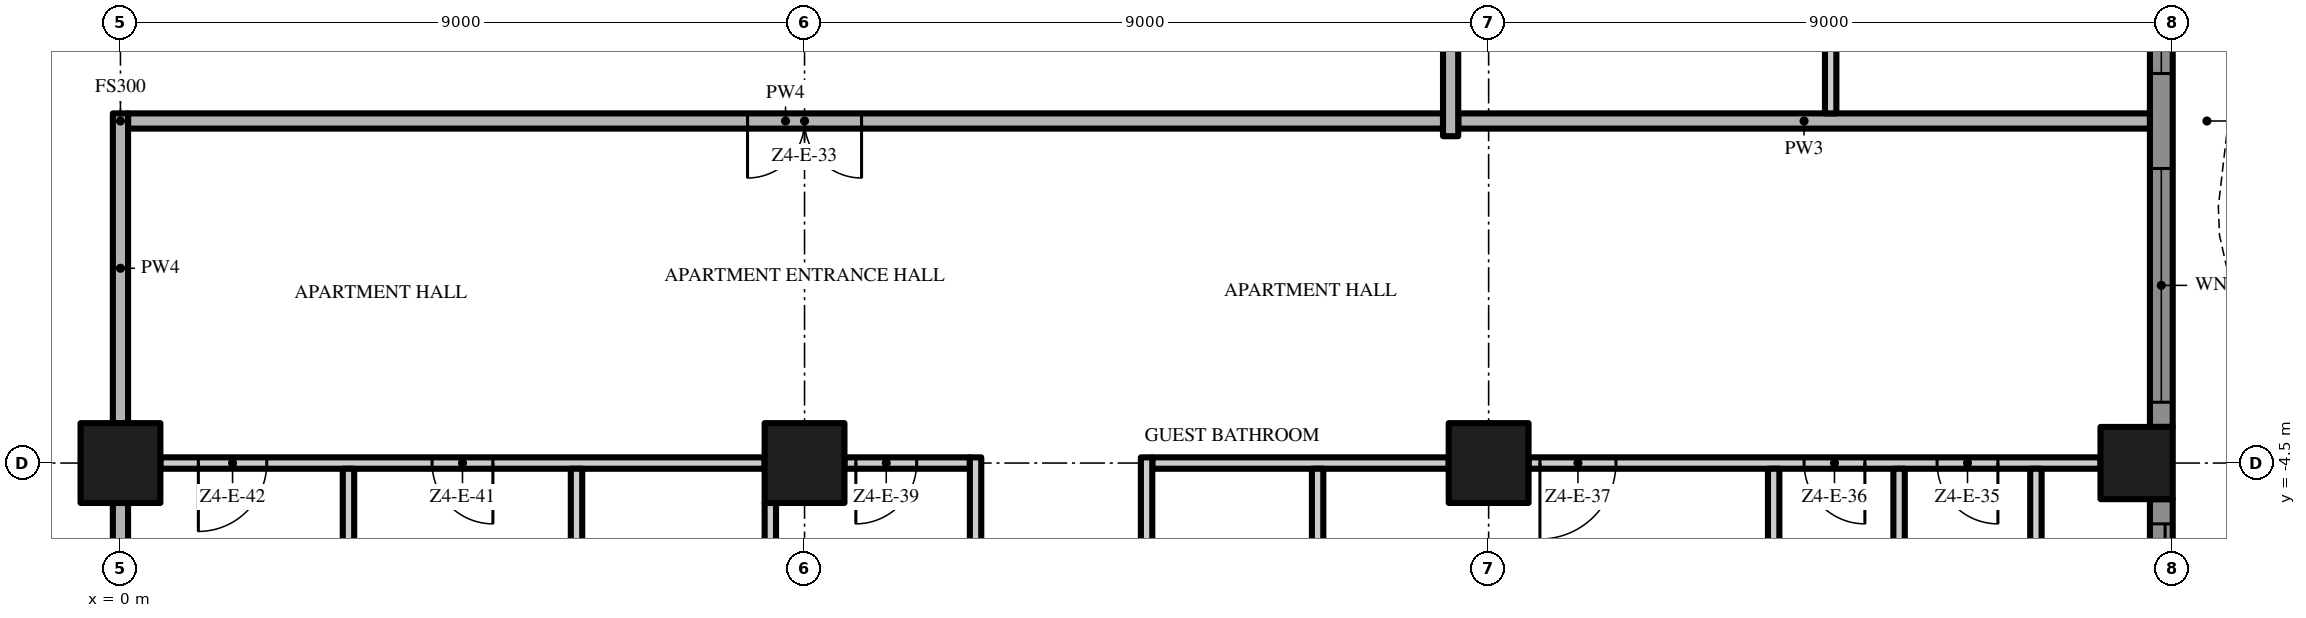
"""IFC4 building model, lengths in metres.
Left out: names, types, materials, properties, quantities, classifications, styles, units other than length and angle.
Written with IfcOpenShell. Run it as: python <this file> out.ifc"""

import sys

from ifc_helpers import new_model, si_unit, direction, frame, frame_2d, origin, origin_2d, place, context, subcontext, project, spatial, polyline, rectangle, outline, extrude, element, fill, save


model = new_model("IFC4")
c1 = context("Model", 3, precision=1e-05, world=origin(), true_north=direction((0.0, 1.0)))
c2 = subcontext(c1, "Body", "Model", "MODEL_VIEW")
j1 = project(units=[si_unit("LENGTHUNIT", "METRE"), si_unit("PLANEANGLEUNIT", "RADIAN")], contexts=[c1])
p1 = place(None, origin())
s1 = spatial("IfcSite", under=j1, at=p1, CompositionType="ELEMENT")
p2 = place(p1, origin())
s2 = spatial("IfcBuilding", under=s1, at=p2, CompositionType="ELEMENT")
p3 = place(p2, frame((0.0, 0.0, 230.0)))
s3 = spatial("IfcBuildingStorey", under=s2, at=p3, CompositionType="ELEMENT", Elevation=230.0)
for number, where, z_axis, x_axis in (
    (1, (0.0, -4.5, 0.0), (0.0, 0.0, 1.0), (1.0, 0.0, 0.0)),
    (2, (18.0, -4.5, 0.0), (0.0, 0.0, 1.0), (1.0, 0.0, 0.0)),
):
    element("IfcColumn", number, at=place(p3, frame(where, z_axis=z_axis, x_axis=x_axis)), inside=s3, PredefinedType="COLUMN", context=c2, shape_type="SweptSolid", body=[
        extrude(rectangle(XDim=1.05, YDim=1.05, at=origin_2d()), origin(), (0.0, 0.0, 1.0), 3.5),
    ])
p4 = place(p3, frame((26.525, -4.5, 0.0), z_axis=(0.0, 0.0, 1.0), x_axis=(1.0, 0.0, 0.0)))
e3 = element("IfcColumn", 3, at=p4, inside=s3, PredefinedType="COLUMN", context=c2, shape_type="SweptSolid", body=[
    extrude(rectangle(XDim=0.95, YDim=0.95, at=origin_2d()), origin(), (0.0, 0.0, 1.0), 3.5),
])
p5 = place(p3, frame((9.0, -4.5, 0.0), z_axis=(0.0, 0.0, 1.0), x_axis=(1.0, 0.0, 0.0)))
e4 = element("IfcColumn", 4, at=p5, inside=s3, PredefinedType="COLUMN", context=c2, shape_type="SweptSolid", body=[
    extrude(rectangle(XDim=1.05, YDim=1.05, at=origin_2d()), origin(), (0.0, 0.0, 1.0), 3.5),
])
p6 = place(p3, frame((26.85, -4.975, 0.0), z_axis=(0.0, 0.0, 1.0), x_axis=(0.0, -1.0, 0.0)))
e5 = element("IfcWall", 5, at=p6, inside=s3, PredefinedType="SOLIDWALL", context=c2, shape_type="SweptSolid", body=[
    extrude(rectangle(XDim=8.05, YDim=0.3, at=frame_2d((4.025, 0.0))), origin(), (0.0, 0.0, 1.0), 3.5),
])
p7 = place(p6, frame((4.65, 0.0, 0.0)))
e6 = element("IfcOpeningElement", 6, at=p7, cuts=e5, PredefinedType="OPENING", context=c2, shape_type="SweptSolid", body=[
    extrude(rectangle(XDim=3.075, YDim=2.4, at=frame_2d((1.538, 1.2))), frame((0.0, 0.16, 0.0), z_axis=(0.0, -1.0, 0.0), x_axis=(1.0, 0.0, 0.0)), (0.0, 0.0, 1.0), 0.32),
])
p8 = place(p6, frame((0.325, 0.0, 0.0)))
e7 = element("IfcOpeningElement", 7, at=p8, cuts=e5, PredefinedType="OPENING", context=c2, shape_type="SweptSolid", body=[
    extrude(rectangle(XDim=3.075, YDim=2.4, at=frame_2d((1.538, 1.2))), frame((0.0, 0.16, 0.0), z_axis=(0.0, -1.0, 0.0), x_axis=(1.0, 0.0, 0.0)), (0.0, 0.0, 1.0), 0.32),
])
p9 = place(p3, frame((26.85, 4.025, 0.0), z_axis=(0.0, 0.0, 1.0), x_axis=(0.0, -1.0, 0.0)))
e8 = element("IfcWall", 8, at=p9, inside=s3, PredefinedType="SOLIDWALL", context=c2, shape_type="SweptSolid", body=[
    extrude(rectangle(XDim=8.05, YDim=0.3, at=frame_2d((4.025, 0.0))), origin(), (0.0, 0.0, 1.0), 3.5),
])
p10 = place(p9, frame((4.65, 0.0, 0.45)))
e9 = element("IfcOpeningElement", 9, at=p10, cuts=e8, PredefinedType="OPENING", context=c2, shape_type="SweptSolid", body=[
    extrude(rectangle(XDim=3.075, YDim=2.65, at=frame_2d((1.538, 1.325))), frame((0.0, 0.16, 0.0), z_axis=(0.0, -1.0, 0.0), x_axis=(1.0, 0.0, 0.0)), (0.0, 0.0, 1.0), 0.32),
])
p11 = place(p9, frame((0.325, 0.0, 0.45)))
e10 = element("IfcOpeningElement", 10, at=p11, cuts=e8, PredefinedType="OPENING", context=c2, shape_type="SweptSolid", body=[
    extrude(rectangle(XDim=3.075, YDim=2.65, at=frame_2d((1.538, 1.325))), frame((0.0, 0.16, 0.0), z_axis=(0.0, -1.0, 0.0), x_axis=(1.0, 0.0, 0.0)), (0.0, 0.0, 1.0), 0.32),
])
p12 = place(p3, origin())
e11 = element("IfcWall", 11, at=p12, inside=s3, PredefinedType="USERDEFINED", context=c2, shape_type="SweptSolid", body=[
    extrude(outline(polyline([(27.951, -18.0), (27.615, -16.5), (27.6, -16.125), (27.731, -15.0), (28.255, -13.5), (28.988, -12.0), (29.649, -10.5), (29.985, -9.0), (30.0, -8.625), (29.869, -7.5), (29.345, -6.0), (28.612, -4.5), (27.951, -3.0), (27.615, -1.5), (27.6, -1.125), (27.731, 0.0), (28.255, 1.5), (28.988, 3.0), (29.649, 4.5), (29.985, 6.0), (30.0, 6.375), (29.869, 7.5), (29.345, 9.0), (28.612, 10.5), (27.951, 12.0), (27.615, 13.5), (27.6, 13.875), (27.731, 15.0), (28.255, 16.5), (28.988, 18.0), (28.763, 18.11), (28.024, 16.596), (27.486, 15.056), (27.349, 13.885), (27.366, 13.467), (27.713, 11.921), (28.385, 10.395), (29.114, 8.904), (29.624, 7.444), (29.749, 6.365), (29.736, 6.033), (29.41, 4.579), (28.761, 3.105), (28.024, 1.596), (27.486, 0.056), (27.349, -1.115), (27.366, -1.533), (27.713, -3.079), (28.385, -4.605), (29.114, -6.096), (29.624, -7.556), (29.749, -8.635), (29.736, -8.967), (29.41, -10.421), (28.761, -11.895), (28.024, -13.404), (27.486, -14.944), (27.349, -16.115), (27.366, -16.533), (27.708, -18.055), (27.951, -18.0)])), origin(), (0.0, 0.0, 1.0), 0.9),
])
p13 = place(p3, frame((8.475, -4.5, 0.0), z_axis=(0.0, 0.0, 1.0), x_axis=(-1.0, 0.0, 0.0)))
e12 = element("IfcWall", 12, at=p13, inside=s3, PredefinedType="PARTITIONING", context=c2, shape_type="SweptSolid", body=[
    extrude(rectangle(XDim=7.95, YDim=0.15, at=frame_2d((3.975, 0.0))), origin(), (0.0, 0.0, 1.0), 3.5),
])
p14 = place(p13, frame((3.575, 0.0, 0.0)))
e13 = element("IfcOpeningElement", 13, at=p14, cuts=e12, PredefinedType="OPENING", context=c2, shape_type="SweptSolid", body=[
    extrude(rectangle(XDim=0.8, YDim=2.0, at=frame_2d((0.4, 1.0))), frame((0.0, 0.085, 0.0), z_axis=(0.0, -1.0, 0.0), x_axis=(1.0, 0.0, 0.0)), (0.0, 0.0, 1.0), 0.17),
])
p15 = place(p13, frame((6.55, 0.0, 0.0)))
e14 = element("IfcOpeningElement", 14, at=p15, cuts=e12, PredefinedType="OPENING", context=c2, shape_type="SweptSolid", body=[
    extrude(rectangle(XDim=0.9, YDim=2.1, at=frame_2d((0.45, 1.05))), frame((0.0, 0.085, 0.0), z_axis=(0.0, -1.0, 0.0), x_axis=(1.0, 0.0, 0.0)), (0.0, 0.0, 1.0), 0.17),
])
p16 = place(p3, frame((11.175, -4.5, 0.0), z_axis=(0.0, 0.0, 1.0), x_axis=(-1.0, 0.0, 0.0)))
e15 = element("IfcWall", 15, at=p16, inside=s3, PredefinedType="PARTITIONING", context=c2, shape_type="SweptSolid", body=[
    extrude(rectangle(XDim=1.65, YDim=0.15, at=frame_2d((0.825, 0.0))), origin(), (0.0, 0.0, 1.0), 3.5),
])
p17 = place(p16, frame((0.7, 0.0, 0.0)))
e16 = element("IfcOpeningElement", 16, at=p17, cuts=e15, PredefinedType="OPENING", context=c2, shape_type="SweptSolid", body=[
    extrude(rectangle(XDim=0.8, YDim=2.0, at=frame_2d((0.4, 1.0))), frame((0.0, 0.085, 0.0), z_axis=(0.0, -1.0, 0.0), x_axis=(1.0, 0.0, 0.0)), (0.0, 0.0, 1.0), 0.17),
])
p18 = place(p3, frame((13.575, -4.5, 0.0), z_axis=(0.0, 0.0, 1.0), x_axis=(1.0, 0.0, 0.0)))
e17 = element("IfcWall", 17, at=p18, inside=s3, PredefinedType="PARTITIONING", context=c2, shape_type="SweptSolid", body=[
    extrude(rectangle(XDim=3.9, YDim=0.15, at=frame_2d((1.95, 0.0))), origin(), (0.0, 0.0, 1.0), 3.5),
])
p19 = place(p3, frame((26.05, -4.5, 0.0), z_axis=(0.0, 0.0, 1.0), x_axis=(-1.0, 0.0, 0.0)))
e18 = element("IfcWall", 18, at=p19, inside=s3, PredefinedType="PARTITIONING", context=c2, shape_type="SweptSolid", body=[
    extrude(rectangle(XDim=7.525, YDim=0.15, at=frame_2d((3.763, 0.0))), origin(), (0.0, 0.0, 1.0), 3.5),
])
p20 = place(p19, frame((1.35, 0.0, 0.0)))
e19 = element("IfcOpeningElement", 19, at=p20, cuts=e18, PredefinedType="OPENING", context=c2, shape_type="SweptSolid", body=[
    extrude(rectangle(XDim=0.8, YDim=2.0, at=frame_2d((0.4, 1.0))), frame((0.0, 0.085, 0.0), z_axis=(0.0, -1.0, 0.0), x_axis=(1.0, 0.0, 0.0)), (0.0, 0.0, 1.0), 0.17),
])
p21 = place(p19, frame((3.1, 0.0, 0.0)))
e20 = element("IfcOpeningElement", 20, at=p21, cuts=e18, PredefinedType="OPENING", context=c2, shape_type="SweptSolid", body=[
    extrude(rectangle(XDim=0.8, YDim=2.0, at=frame_2d((0.4, 1.0))), frame((0.0, 0.085, 0.0), z_axis=(0.0, -1.0, 0.0), x_axis=(1.0, 0.0, 0.0)), (0.0, 0.0, 1.0), 0.17),
])
p22 = place(p19, frame((6.375, 0.0, 0.0)))
e21 = element("IfcOpeningElement", 21, at=p22, cuts=e18, PredefinedType="OPENING", context=c2, shape_type="SweptSolid", body=[
    extrude(rectangle(XDim=1.0, YDim=2.4, at=frame_2d((0.5, 1.2))), frame((0.0, 0.085, 0.0), z_axis=(0.0, -1.0, 0.0), x_axis=(1.0, 0.0, 0.0)), (0.0, 0.0, 1.0), 0.17),
])
p23 = place(p3, frame((17.4, 0.0, 0.0), z_axis=(0.0, 0.0, 1.0), x_axis=(-1.0, 0.0, 0.0)))
e22 = element("IfcWall", 22, at=p23, inside=s3, PredefinedType="PARTITIONING", context=c2, shape_type="SweptSolid", body=[
    extrude(rectangle(XDim=17.3, YDim=0.2, at=frame_2d((8.65, 0.0))), origin(), (0.0, 0.0, 1.0), 3.5),
])
p24 = place(p23, frame((7.65, 0.0, 0.0)))
e23 = element("IfcOpeningElement", 23, at=p24, cuts=e22, PredefinedType="OPENING", context=c2, shape_type="SweptSolid", body=[
    extrude(rectangle(XDim=1.5, YDim=2.4, at=frame_2d((0.75, 1.2))), frame((0.0, 0.11, 0.0), z_axis=(0.0, -1.0, 0.0), x_axis=(1.0, 0.0, 0.0)), (0.0, 0.0, 1.0), 0.22),
])
p25 = place(p3, frame((17.6, 0.0, 0.0), z_axis=(0.0, 0.0, 1.0), x_axis=(1.0, 0.0, 0.0)))
e24 = element("IfcWall", 24, at=p25, inside=s3, PredefinedType="PARTITIONING", context=c2, shape_type="SweptSolid", body=[
    extrude(rectangle(XDim=9.1, YDim=0.2, at=frame_2d((4.55, 0.0))), origin(), (0.0, 0.0, 1.0), 3.5),
])
p26 = place(p3, frame((0.0, -12.975, 0.0), z_axis=(0.0, 0.0, 1.0), x_axis=(0.0, 1.0, 0.0)))
e25 = element("IfcWall", 25, at=p26, inside=s3, PredefinedType="PARTITIONING", context=c2, shape_type="SweptSolid", body=[
    extrude(rectangle(XDim=7.95, YDim=0.2, at=frame_2d((3.975, 0.0))), origin(), (0.0, 0.0, 1.0), 3.5),
])
p27 = place(p3, frame((0.0, -3.975, 0.0), z_axis=(0.0, 0.0, 1.0), x_axis=(0.0, 1.0, 0.0)))
e26 = element("IfcWall", 26, at=p27, inside=s3, PredefinedType="PARTITIONING", context=c2, shape_type="SweptSolid", body=[
    extrude(rectangle(XDim=4.075, YDim=0.2, at=frame_2d((2.038, 0.0))), origin(), (0.0, 0.0, 1.0), 3.5),
])
for number, where, z_axis, x_axis in (
    (27, (3.0, -8.925, 0.0), (0.0, 0.0, 1.0), (0.0, 1.0, 0.0)),
    (28, (6.0, -8.925, 0.0), (0.0, 0.0, 1.0), (0.0, 1.0, 0.0)),
):
    element("IfcWall", number, at=place(p3, frame(where, z_axis=z_axis, x_axis=x_axis)), inside=s3, PredefinedType="PARTITIONING", context=c2, shape_type="SweptSolid", body=[
        extrude(rectangle(XDim=4.35, YDim=0.15, at=frame_2d((2.175, 0.0))), origin(), (0.0, 0.0, 1.0), 3.5),
    ])
p28 = place(p3, frame((8.55, -8.925, 0.0), z_axis=(0.0, 0.0, 1.0), x_axis=(0.0, 1.0, 0.0)))
e29 = element("IfcWall", 29, at=p28, inside=s3, PredefinedType="PARTITIONING", context=c2, shape_type="SweptSolid", body=[
    extrude(rectangle(XDim=3.9, YDim=0.15, at=frame_2d((1.95, 0.0))), origin(), (0.0, 0.0, 1.0), 3.5),
])
p29 = place(p3, frame((11.25, -9.075, 0.0), z_axis=(0.0, 0.0, 1.0), x_axis=(0.0, 1.0, 0.0)))
e30 = element("IfcWall", 30, at=p29, inside=s3, PredefinedType="PARTITIONING", context=c2, shape_type="SweptSolid", body=[
    extrude(rectangle(XDim=4.65, YDim=0.15, at=frame_2d((2.325, 0.0))), origin(), (0.0, 0.0, 1.0), 3.5),
])
p30 = place(p3, frame((13.5, -4.425, 0.0), z_axis=(0.0, 0.0, 1.0), x_axis=(0.0, -1.0, 0.0)))
e31 = element("IfcWall", 31, at=p30, inside=s3, PredefinedType="PARTITIONING", context=c2, shape_type="SweptSolid", body=[
    extrude(rectangle(XDim=4.65, YDim=0.15, at=frame_2d((2.325, 0.0))), origin(), (0.0, 0.0, 1.0), 3.5),
])
p31 = place(p30, frame((1.875, 0.0, 0.0)))
e32 = element("IfcOpeningElement", 32, at=p31, cuts=e31, PredefinedType="OPENING", context=c2, shape_type="SweptSolid", body=[
    extrude(rectangle(XDim=0.9, YDim=2.1, at=frame_2d((0.45, 1.05))), frame((0.0, 0.085, 0.0), z_axis=(0.0, -1.0, 0.0), x_axis=(1.0, 0.0, 0.0)), (0.0, 0.0, 1.0), 0.17),
])
p32 = place(p3, frame((15.75, -8.925, 0.0), z_axis=(0.0, 0.0, 1.0), x_axis=(0.0, 1.0, 0.0)))
e33 = element("IfcWall", 33, at=p32, inside=s3, PredefinedType="PARTITIONING", context=c2, shape_type="SweptSolid", body=[
    extrude(rectangle(XDim=4.35, YDim=0.15, at=frame_2d((2.175, 0.0))), origin(), (0.0, 0.0, 1.0), 3.5),
])
p33 = place(p3, frame((17.5, -0.2, 0.0), z_axis=(0.0, 0.0, 1.0), x_axis=(0.0, 1.0, 0.0)))
e34 = element("IfcWall", 34, at=p33, inside=s3, PredefinedType="PARTITIONING", context=c2, shape_type="SweptSolid", body=[
    extrude(rectangle(XDim=4.175, YDim=0.2, at=frame_2d((2.087, 0.0))), origin(), (0.0, 0.0, 1.0), 3.5),
])
p34 = place(p3, frame((21.75, -8.925, 0.0), z_axis=(0.0, 0.0, 1.0), x_axis=(0.0, 1.0, 0.0)))
e35 = element("IfcWall", 35, at=p34, inside=s3, PredefinedType="PARTITIONING", context=c2, shape_type="SweptSolid", body=[
    extrude(rectangle(XDim=4.35, YDim=0.15, at=frame_2d((2.175, 0.0))), origin(), (0.0, 0.0, 1.0), 3.5),
])
p35 = place(p3, frame((22.5, 17.525, 0.0), z_axis=(0.0, 0.0, 1.0), x_axis=(0.0, -1.0, 0.0)))
e36 = element("IfcWall", 36, at=p35, inside=s3, PredefinedType="PARTITIONING", context=c2, shape_type="SweptSolid", body=[
    extrude(rectangle(XDim=17.425, YDim=0.15, at=frame_2d((8.713, 0.0))), origin(), (0.0, 0.0, 1.0), 3.5),
])
p36 = place(p35, frame((14.775, 0.0, 0.0)))
e37 = element("IfcOpeningElement", 37, at=p36, cuts=e36, PredefinedType="OPENING", context=c2, shape_type="SweptSolid", body=[
    extrude(rectangle(XDim=1.0, YDim=2.4, at=frame_2d((0.5, 1.2))), frame((0.0, 0.085, 0.0), z_axis=(0.0, -1.0, 0.0), x_axis=(1.0, 0.0, 0.0)), (0.0, 0.0, 1.0), 0.17),
])
p37 = place(p35, frame((9.175, 0.0, 0.0)))
e38 = element("IfcOpeningElement", 38, at=p37, cuts=e36, PredefinedType="OPENING", context=c2, shape_type="SweptSolid", body=[
    extrude(rectangle(XDim=1.0, YDim=2.4, at=frame_2d((0.5, 1.2))), frame((0.0, 0.085, 0.0), z_axis=(0.0, -1.0, 0.0), x_axis=(1.0, 0.0, 0.0)), (0.0, 0.0, 1.0), 0.17),
])
p38 = place(p35, frame((6.925, 0.0, 0.0)))
e39 = element("IfcOpeningElement", 39, at=p38, cuts=e36, PredefinedType="OPENING", context=c2, shape_type="SweptSolid", body=[
    extrude(rectangle(XDim=1.0, YDim=2.4, at=frame_2d((0.5, 1.2))), frame((0.0, 0.085, 0.0), z_axis=(0.0, -1.0, 0.0), x_axis=(1.0, 0.0, 0.0)), (0.0, 0.0, 1.0), 0.17),
])
for number, where, z_axis, x_axis in (
    (40, (23.4, -8.925, 0.0), (0.0, 0.0, 1.0), (0.0, 1.0, 0.0)),
    (41, (25.2, -8.925, 0.0), (0.0, 0.0, 1.0), (0.0, 1.0, 0.0)),
):
    element("IfcWall", number, at=place(p3, frame(where, z_axis=z_axis, x_axis=x_axis)), inside=s3, PredefinedType="PARTITIONING", context=c2, shape_type="SweptSolid", body=[
        extrude(rectangle(XDim=4.35, YDim=0.15, at=frame_2d((2.175, 0.0))), origin(), (0.0, 0.0, 1.0), 3.5),
    ])
p39 = place(p8, origin())
e42 = element("IfcDoor", 42, at=p39, inside=s3, OperationType="SINGLE_SWING_LEFT", PredefinedType="DOOR", context=c2, shape_type="SweptSolid", body=[
    extrude(rectangle(XDim=3.075, YDim=2.4, at=frame_2d((1.538, 1.2))), frame((0.0, 0.025, 0.0), z_axis=(0.0, -1.0, 0.0), x_axis=(1.0, 0.0, 0.0)), (0.0, 0.0, 1.0), 0.05),
])
fill(e7, e42)
p40 = place(p10, origin())
e43 = element("IfcWindow", 43, at=p40, inside=s3, PartitioningType="SINGLE_PANEL", PredefinedType="WINDOW", context=c2, shape_type="SweptSolid", body=[
    extrude(rectangle(XDim=3.075, YDim=2.65, at=frame_2d((1.538, 1.325))), frame((0.0, 0.03, 0.0), z_axis=(0.0, -1.0, 0.0), x_axis=(1.0, 0.0, 0.0)), (0.0, 0.0, 1.0), 0.06),
])
fill(e9, e43)
p41 = place(p11, origin())
e44 = element("IfcWindow", 44, at=p41, inside=s3, PartitioningType="SINGLE_PANEL", PredefinedType="WINDOW", context=c2, shape_type="SweptSolid", body=[
    extrude(rectangle(XDim=3.075, YDim=2.65, at=frame_2d((1.538, 1.325))), frame((0.0, 0.03, 0.0), z_axis=(0.0, -1.0, 0.0), x_axis=(1.0, 0.0, 0.0)), (0.0, 0.0, 1.0), 0.06),
])
fill(e10, e44)
p42 = place(p24, origin())
e45 = element("IfcDoor", 45, at=p42, inside=s3, OperationType="DOUBLE_DOOR_SINGLE_SWING", PredefinedType="DOOR", context=c2, shape_type="SweptSolid", body=[
    extrude(rectangle(XDim=1.5, YDim=2.4, at=frame_2d((0.75, 1.2))), frame((0.0, 0.025, 0.0), z_axis=(0.0, -1.0, 0.0), x_axis=(1.0, 0.0, 0.0)), (0.0, 0.0, 1.0), 0.05),
])
fill(e23, e45)
p43 = place(p20, origin())
e46 = element("IfcDoor", 46, at=p43, inside=s3, OperationType="SINGLE_SWING_LEFT", PredefinedType="DOOR", context=c2, shape_type="SweptSolid", body=[
    extrude(rectangle(XDim=0.8, YDim=2.0, at=frame_2d((0.4, 1.0))), frame((0.0, 0.025, 0.0), z_axis=(0.0, -1.0, 0.0), x_axis=(1.0, 0.0, 0.0)), (0.0, 0.0, 1.0), 0.05),
])
fill(e19, e46)
p44 = place(p21, origin())
e47 = element("IfcDoor", 47, at=p44, inside=s3, OperationType="SINGLE_SWING_LEFT", PredefinedType="DOOR", context=c2, shape_type="SweptSolid", body=[
    extrude(rectangle(XDim=0.8, YDim=2.0, at=frame_2d((0.4, 1.0))), frame((0.0, 0.025, 0.0), z_axis=(0.0, -1.0, 0.0), x_axis=(1.0, 0.0, 0.0)), (0.0, 0.0, 1.0), 0.05),
])
fill(e20, e47)
p45 = place(p22, origin())
e48 = element("IfcDoor", 48, at=p45, inside=s3, OperationType="SINGLE_SWING_RIGHT", PredefinedType="DOOR", context=c2, shape_type="SweptSolid", body=[
    extrude(rectangle(XDim=1.0, YDim=2.4, at=frame_2d((0.5, 1.2))), frame((0.0, 0.025, 0.0), z_axis=(0.0, -1.0, 0.0), x_axis=(1.0, 0.0, 0.0)), (0.0, 0.0, 1.0), 0.05),
])
fill(e21, e48)
p46 = place(p17, origin())
e49 = element("IfcDoor", 49, at=p46, inside=s3, OperationType="SINGLE_SWING_RIGHT", PredefinedType="DOOR", context=c2, shape_type="SweptSolid", body=[
    extrude(rectangle(XDim=0.8, YDim=2.0, at=frame_2d((0.4, 1.0))), frame((0.0, 0.025, 0.0), z_axis=(0.0, -1.0, 0.0), x_axis=(1.0, 0.0, 0.0)), (0.0, 0.0, 1.0), 0.05),
])
fill(e16, e49)
p47 = place(p14, origin())
e50 = element("IfcDoor", 50, at=p47, inside=s3, OperationType="SINGLE_SWING_LEFT", PredefinedType="DOOR", context=c2, shape_type="SweptSolid", body=[
    extrude(rectangle(XDim=0.8, YDim=2.0, at=frame_2d((0.4, 1.0))), frame((0.0, 0.025, 0.0), z_axis=(0.0, -1.0, 0.0), x_axis=(1.0, 0.0, 0.0)), (0.0, 0.0, 1.0), 0.05),
])
fill(e13, e50)
p48 = place(p15, origin())
e51 = element("IfcDoor", 51, at=p48, inside=s3, OperationType="SINGLE_SWING_RIGHT", PredefinedType="DOOR", context=c2, shape_type="SweptSolid", body=[
    extrude(rectangle(XDim=0.9, YDim=2.1, at=frame_2d((0.45, 1.05))), frame((0.0, 0.025, 0.0), z_axis=(0.0, -1.0, 0.0), x_axis=(1.0, 0.0, 0.0)), (0.0, 0.0, 1.0), 0.05),
])
fill(e14, e51)
save(model, sys.argv[1])
